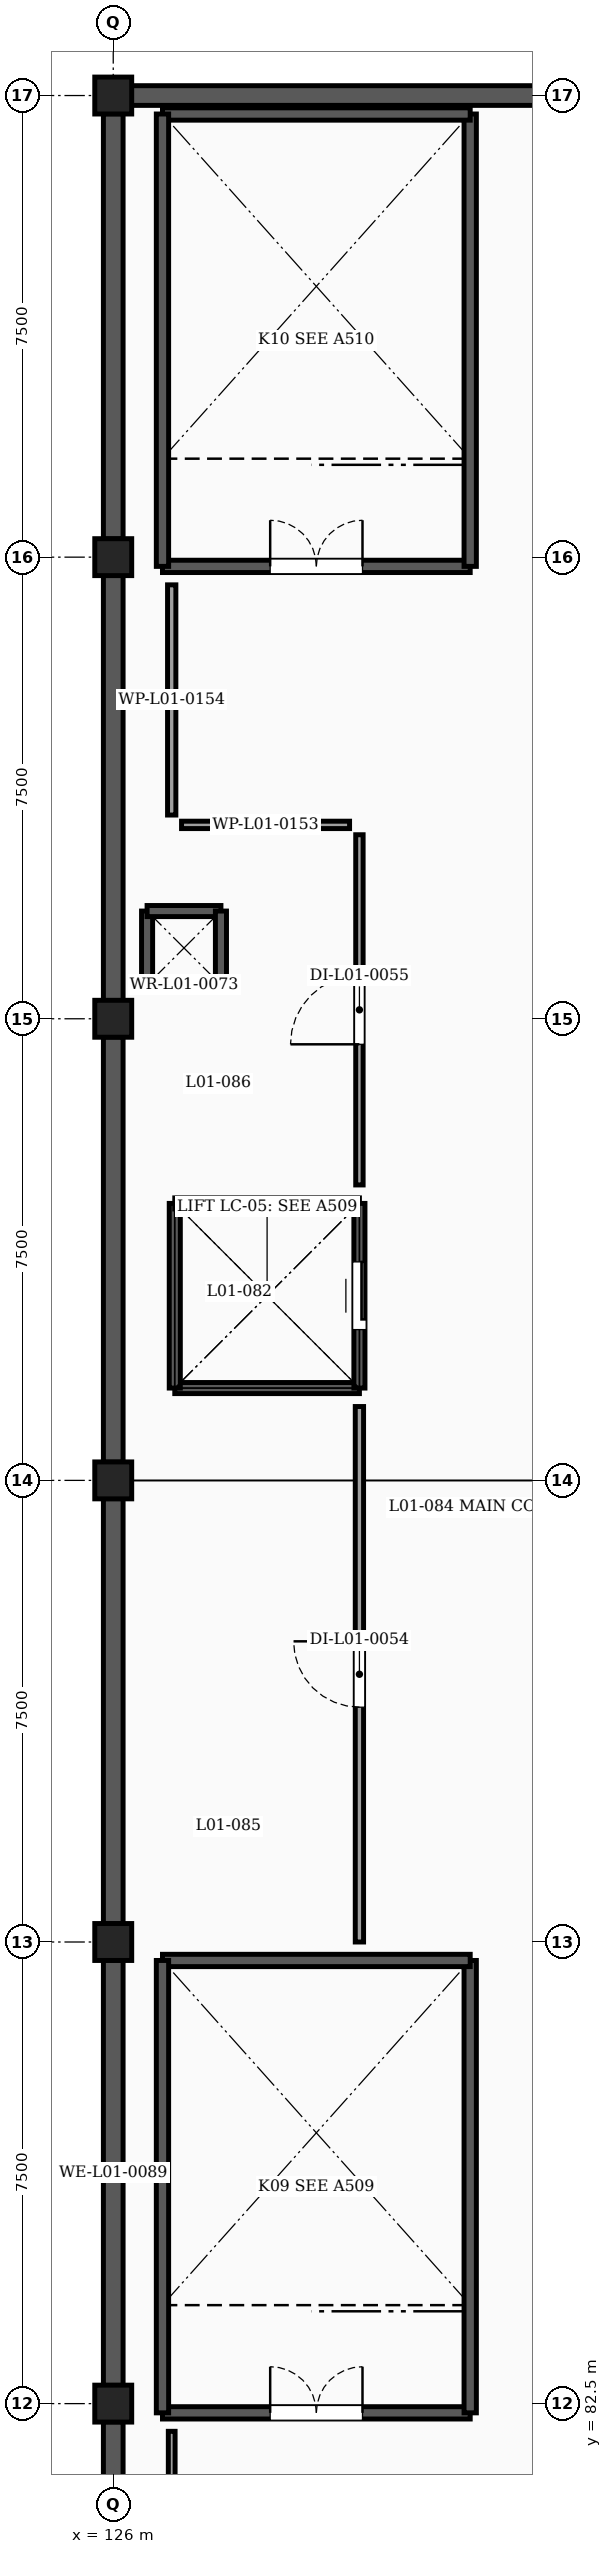
"""IFC4 building model, lengths in metres.
Left out: names, types, materials, properties, quantities, classifications, styles, units other than length and angle.
Written with IfcOpenShell. Run it as: python <this file> out.ifc"""

import sys

from ifc_helpers import new_model, si_unit, direction, frame, frame_2d, origin, origin_2d, place, context, subcontext, project, spatial, rectangle, extrude, element, fill, save


model = new_model("IFC4")
c1 = context("Model", 3, precision=1e-05, world=origin(), true_north=direction((0.0, 1.0)))
c2 = subcontext(c1, "Body", "Model", "MODEL_VIEW")
j1 = project(units=[si_unit("LENGTHUNIT", "METRE"), si_unit("PLANEANGLEUNIT", "RADIAN")], contexts=[c1])
p1 = place(None, origin())
s1 = spatial("IfcSite", under=j1, at=p1, CompositionType="ELEMENT")
p2 = place(p1, origin())
s2 = spatial("IfcBuilding", under=s1, at=p2, CompositionType="ELEMENT")
p3 = place(p2, frame((0.0, 0.0, 4.5)))
s3 = spatial("IfcBuildingStorey", under=s2, at=p3, CompositionType="ELEMENT", Elevation=4.5)
for number, where, z_axis, x_axis in (
    (1, (126.0, 82.5, 0.0), (0.0, 0.0, 1.0), (1.0, 0.0, 0.0)),
    (2, (126.0, 90.0, 0.0), (0.0, 0.0, 1.0), (1.0, 0.0, 0.0)),
    (3, (126.0, 97.5, 0.0), (0.0, 0.0, 1.0), (1.0, 0.0, 0.0)),
    (4, (126.0, 105.0, 0.0), (0.0, 0.0, 1.0), (1.0, 0.0, 0.0)),
    (5, (126.0, 112.5, 0.0), (0.0, 0.0, 1.0), (1.0, 0.0, 0.0)),
    (6, (126.0, 120.0, 0.0), (0.0, 0.0, 1.0), (1.0, 0.0, 0.0)),
):
    element("IfcColumn", number, at=place(p3, frame(where, z_axis=z_axis, x_axis=x_axis)), inside=s3, PredefinedType="COLUMN", context=c2, shape_type="SweptSolid", body=[
        extrude(rectangle(XDim=0.6, YDim=0.6, at=origin_2d()), origin(), (0.0, 0.0, 1.0), 3.62),
    ])
for number, where, z_axis, x_axis in (
    (7, (126.0, 75.296, 0.0), (0.0, 0.0, 1.0), (0.0, 1.0, 0.0)),
    (8, (126.0, 82.796, 0.0), (0.0, 0.0, 1.0), (0.0, 1.0, 0.0)),
    (9, (126.0, 90.296, 0.0), (0.0, 0.0, 1.0), (0.0, 1.0, 0.0)),
    (10, (126.0, 97.796, 0.0), (0.0, 0.0, 1.0), (0.0, 1.0, 0.0)),
    (11, (126.0, 105.296, 0.0), (0.0, 0.0, 1.0), (0.0, 1.0, 0.0)),
    (12, (126.0, 112.796, 0.0), (0.0, 0.0, 1.0), (0.0, 1.0, 0.0)),
):
    element("IfcWall", number, at=place(p3, frame(where, z_axis=z_axis, x_axis=x_axis)), inside=s3, PredefinedType="SOLIDWALL", context=c2, shape_type="SweptSolid", body=[
        extrude(rectangle(XDim=6.908, YDim=0.32, at=frame_2d((3.454, 0.0))), origin(), (0.0, 0.0, 1.0), 3.027),
    ])
p4 = place(p3, frame((126.296, 120.0, 0.0), z_axis=(0.0, 0.0, 1.0), x_axis=(1.0, 0.0, 0.0)))
e13 = element("IfcWall", 13, at=p4, inside=s3, PredefinedType="SOLIDWALL", context=c2, shape_type="SweptSolid", body=[
    extrude(rectangle(XDim=8.483, YDim=0.32, at=frame_2d((4.242, 0.0))), origin(), (0.0, 0.0, 1.0), 3.027),
])
for number, where, z_axis, x_axis in (
    (14, (127.75, 105.55, 0.0), (0.0, 0.0, 1.0), (-1.0, 0.0, 0.0)),
    (15, (126.55, 105.55, 0.0), (0.0, 0.0, 1.0), (0.0, 1.0, 0.0)),
    (16, (126.55, 106.75, 0.0), (0.0, 0.0, 1.0), (1.0, 0.0, 0.0)),
    (17, (127.75, 106.75, 0.0), (0.0, 0.0, 1.0), (0.0, -1.0, 0.0)),
):
    element("IfcWall", number, at=place(p3, frame(where, z_axis=z_axis, x_axis=x_axis)), inside=s3, PredefinedType="SHEAR", context=c2, shape_type="SweptSolid", body=[
        extrude(rectangle(XDim=1.2, YDim=0.18, at=frame_2d((0.6, 0.0))), origin(), (0.0, 0.0, 1.0), 3.62),
    ])
p5 = place(p3, frame((126.8, 82.35, 0.0), z_axis=(0.0, 0.0, 1.0), x_axis=(1.0, 0.0, 0.0)))
e18 = element("IfcWall", 18, at=p5, inside=s3, PredefinedType="SHEAR", context=c2, shape_type="SweptSolid", body=[
    extrude(rectangle(XDim=5.0, YDim=0.2, at=frame_2d((2.5, 0.0))), origin(), (0.0, 0.0, 1.0), 3.62),
])
p6 = place(p5, frame((1.75, 0.0, 0.0)))
e19 = element("IfcOpeningElement", 19, at=p6, cuts=e18, PredefinedType="OPENING", context=c2, shape_type="SweptSolid", body=[
    extrude(rectangle(XDim=1.5, YDim=2.15, at=frame_2d((0.75, 1.075))), frame((0.0, 0.11, 0.0), z_axis=(0.0, -1.0, 0.0), x_axis=(1.0, 0.0, 0.0)), (0.0, 0.0, 1.0), 0.22),
])
p7 = place(p3, frame((131.8, 82.35, 0.0), z_axis=(0.0, 0.0, 1.0), x_axis=(0.0, 1.0, 0.0)))
e20 = element("IfcWall", 20, at=p7, inside=s3, PredefinedType="SHEAR", context=c2, shape_type="SweptSolid", body=[
    extrude(rectangle(XDim=7.35, YDim=0.2, at=frame_2d((3.675, 0.0))), origin(), (0.0, 0.0, 1.0), 3.62),
])
p8 = place(p3, frame((131.8, 89.7, 0.0), z_axis=(0.0, 0.0, 1.0), x_axis=(-1.0, 0.0, 0.0)))
e21 = element("IfcWall", 21, at=p8, inside=s3, PredefinedType="SHEAR", context=c2, shape_type="SweptSolid", body=[
    extrude(rectangle(XDim=5.0, YDim=0.2, at=frame_2d((2.5, 0.0))), origin(), (0.0, 0.0, 1.0), 3.62),
])
p9 = place(p3, frame((126.8, 89.7, 0.0), z_axis=(0.0, 0.0, 1.0), x_axis=(0.0, -1.0, 0.0)))
e22 = element("IfcWall", 22, at=p9, inside=s3, PredefinedType="SHEAR", context=c2, shape_type="SweptSolid", body=[
    extrude(rectangle(XDim=7.35, YDim=0.2, at=frame_2d((3.675, 0.0))), origin(), (0.0, 0.0, 1.0), 3.62),
])
p10 = place(p3, frame((126.8, 112.35, 0.0), z_axis=(0.0, 0.0, 1.0), x_axis=(1.0, 0.0, 0.0)))
e23 = element("IfcWall", 23, at=p10, inside=s3, PredefinedType="SHEAR", context=c2, shape_type="SweptSolid", body=[
    extrude(rectangle(XDim=5.0, YDim=0.2, at=frame_2d((2.5, 0.0))), origin(), (0.0, 0.0, 1.0), 3.62),
])
p11 = place(p10, frame((1.75, 0.0, 0.0)))
e24 = element("IfcOpeningElement", 24, at=p11, cuts=e23, PredefinedType="OPENING", context=c2, shape_type="SweptSolid", body=[
    extrude(rectangle(XDim=1.5, YDim=2.15, at=frame_2d((0.75, 1.075))), frame((0.0, 0.11, 0.0), z_axis=(0.0, -1.0, 0.0), x_axis=(1.0, 0.0, 0.0)), (0.0, 0.0, 1.0), 0.22),
])
p12 = place(p3, frame((131.8, 112.35, 0.0), z_axis=(0.0, 0.0, 1.0), x_axis=(0.0, 1.0, 0.0)))
e25 = element("IfcWall", 25, at=p12, inside=s3, PredefinedType="SHEAR", context=c2, shape_type="SweptSolid", body=[
    extrude(rectangle(XDim=7.35, YDim=0.2, at=frame_2d((3.675, 0.0))), origin(), (0.0, 0.0, 1.0), 3.62),
])
p13 = place(p3, frame((131.8, 119.7, 0.0), z_axis=(0.0, 0.0, 1.0), x_axis=(-1.0, 0.0, 0.0)))
e26 = element("IfcWall", 26, at=p13, inside=s3, PredefinedType="SHEAR", context=c2, shape_type="SweptSolid", body=[
    extrude(rectangle(XDim=5.0, YDim=0.2, at=frame_2d((2.5, 0.0))), origin(), (0.0, 0.0, 1.0), 3.62),
])
p14 = place(p3, frame((126.8, 119.7, 0.0), z_axis=(0.0, 0.0, 1.0), x_axis=(0.0, -1.0, 0.0)))
e27 = element("IfcWall", 27, at=p14, inside=s3, PredefinedType="SHEAR", context=c2, shape_type="SweptSolid", body=[
    extrude(rectangle(XDim=7.35, YDim=0.2, at=frame_2d((3.675, 0.0))), origin(), (0.0, 0.0, 1.0), 3.62),
])
for number, where, z_axis, x_axis in (
    (28, (130.0, 99.0, 0.0), (0.0, 0.0, 1.0), (-1.0, 0.0, 0.0)),
    (29, (127.0, 99.0, 0.0), (0.0, 0.0, 1.0), (0.0, 1.0, 0.0)),
    (30, (127.0, 102.0, 0.0), (0.0, 0.0, 1.0), (1.0, 0.0, 0.0)),
):
    element("IfcWall", number, at=place(p3, frame(where, z_axis=z_axis, x_axis=x_axis)), inside=s3, PredefinedType="SHEAR", context=c2, shape_type="SweptSolid", body=[
        extrude(rectangle(XDim=3.0, YDim=0.18, at=frame_2d((1.5, 0.0))), origin(), (0.0, 0.0, 1.0), 3.62),
    ])
p15 = place(p3, frame((130.0, 102.0, 0.0), z_axis=(0.0, 0.0, 1.0), x_axis=(0.0, -1.0, 0.0)))
e31 = element("IfcWall", 31, at=p15, inside=s3, PredefinedType="SHEAR", context=c2, shape_type="SweptSolid", body=[
    extrude(rectangle(XDim=3.0, YDim=0.18, at=frame_2d((1.5, 0.0))), origin(), (0.0, 0.0, 1.0), 3.62),
])
p16 = place(p15, frame((0.95, 0.0, 0.0)))
e32 = element("IfcOpeningElement", 32, at=p16, cuts=e31, PredefinedType="OPENING", context=c2, shape_type="SweptSolid", body=[
    extrude(rectangle(XDim=1.1, YDim=2.15, at=frame_2d((0.55, 1.075))), frame((0.0, 0.1, 0.0), z_axis=(0.0, -1.0, 0.0), x_axis=(1.0, 0.0, 0.0)), (0.0, 0.0, 1.0), 0.2),
])
p17 = place(p3, frame((126.95, 78.31, 0.0), z_axis=(0.0, 0.0, 1.0), x_axis=(0.0, 1.0, 0.0)))
e33 = element("IfcWall", 33, at=p17, inside=s3, PredefinedType="PARTITIONING", context=c2, shape_type="SweptSolid", body=[
    extrude(rectangle(XDim=3.74, YDim=0.11, at=frame_2d((1.87, 0.0))), origin(), (0.0, 0.0, 1.0), 3.62),
])
p18 = place(p3, frame((130.0, 90.0, 0.0), z_axis=(0.0, 0.0, 1.0), x_axis=(0.0, 1.0, 0.0)))
e34 = element("IfcWall", 34, at=p18, inside=s3, PredefinedType="PARTITIONING", context=c2, shape_type="SweptSolid", body=[
    extrude(rectangle(XDim=8.7, YDim=0.135, at=frame_2d((4.35, 0.0))), origin(), (0.0, 0.0, 1.0), 3.62),
])
p19 = place(p18, frame((3.815, 0.0, 0.0)))
e35 = element("IfcOpeningElement", 35, at=p19, cuts=e34, PredefinedType="OPENING", context=c2, shape_type="SweptSolid", body=[
    extrude(rectangle(XDim=1.07, YDim=2.15, at=frame_2d((0.535, 1.075))), frame((0.0, 0.077, 0.0), z_axis=(0.0, -1.0, 0.0), x_axis=(1.0, 0.0, 0.0)), (0.0, 0.0, 1.0), 0.155),
])
p20 = place(p3, frame((129.84, 108.15, 0.0), z_axis=(0.0, 0.0, 1.0), x_axis=(-1.0, 0.0, 0.0)))
e36 = element("IfcWall", 36, at=p20, inside=s3, PredefinedType="PARTITIONING", context=c2, shape_type="SweptSolid", body=[
    extrude(rectangle(XDim=2.73, YDim=0.12, at=frame_2d((1.365, 0.0))), origin(), (0.0, 0.0, 1.0), 3.62),
])
p21 = place(p3, frame((126.95, 108.31, 0.0), z_axis=(0.0, 0.0, 1.0), x_axis=(0.0, 1.0, 0.0)))
e37 = element("IfcWall", 37, at=p21, inside=s3, PredefinedType="PARTITIONING", context=c2, shape_type="SweptSolid", body=[
    extrude(rectangle(XDim=3.74, YDim=0.135, at=frame_2d((1.87, 0.0))), origin(), (0.0, 0.0, 1.0), 3.62),
])
p22 = place(p3, frame((130.0, 102.3, 0.0), z_axis=(0.0, 0.0, 1.0), x_axis=(0.0, 1.0, 0.0)))
e38 = element("IfcWall", 38, at=p22, inside=s3, PredefinedType="PARTITIONING", context=c2, shape_type="SweptSolid", body=[
    extrude(rectangle(XDim=5.69, YDim=0.12, at=frame_2d((2.845, 0.0))), origin(), (0.0, 0.0, 1.0), 3.62),
])
p23 = place(p22, frame((2.285, 0.0, 0.0)))
e39 = element("IfcOpeningElement", 39, at=p23, cuts=e38, PredefinedType="OPENING", context=c2, shape_type="SweptSolid", body=[
    extrude(rectangle(XDim=1.12, YDim=2.15, at=frame_2d((0.56, 1.075))), frame((0.0, 0.07, 0.0), z_axis=(0.0, -1.0, 0.0), x_axis=(1.0, 0.0, 0.0)), (0.0, 0.0, 1.0), 0.14),
])
p24 = place(p6, origin())
e40 = element("IfcDoor", 40, at=p24, inside=s3, OperationType="DOUBLE_DOOR_SINGLE_SWING", PredefinedType="DOOR", context=c2, shape_type="SweptSolid", body=[
    extrude(rectangle(XDim=1.5, YDim=2.15, at=frame_2d((0.75, 1.075))), frame((0.0, 0.025, 0.0), z_axis=(0.0, -1.0, 0.0), x_axis=(1.0, 0.0, 0.0)), (0.0, 0.0, 1.0), 0.05),
])
fill(e19, e40)
p25 = place(p11, origin())
e41 = element("IfcDoor", 41, at=p25, inside=s3, OperationType="DOUBLE_DOOR_SINGLE_SWING", PredefinedType="DOOR", context=c2, shape_type="SweptSolid", body=[
    extrude(rectangle(XDim=1.5, YDim=2.15, at=frame_2d((0.75, 1.075))), frame((0.0, 0.025, 0.0), z_axis=(0.0, -1.0, 0.0), x_axis=(1.0, 0.0, 0.0)), (0.0, 0.0, 1.0), 0.05),
])
fill(e24, e41)
p26 = place(p16, origin())
e42 = element("IfcDoor", 42, at=p26, inside=s3, OperationType="SLIDING_TO_LEFT", PredefinedType="DOOR", context=c2, shape_type="SweptSolid", body=[
    extrude(rectangle(XDim=1.1, YDim=2.15, at=frame_2d((0.55, 1.075))), frame((0.0, 0.025, 0.0), z_axis=(0.0, -1.0, 0.0), x_axis=(1.0, 0.0, 0.0)), (0.0, 0.0, 1.0), 0.05),
])
fill(e32, e42)
p27 = place(p19, origin())
e43 = element("IfcDoor", 43, at=p27, inside=s3, OperationType="SINGLE_SWING_RIGHT", PredefinedType="DOOR", context=c2, shape_type="SweptSolid", body=[
    extrude(rectangle(XDim=1.07, YDim=2.15, at=frame_2d((0.535, 1.075))), frame((0.0, 0.025, 0.0), z_axis=(0.0, -1.0, 0.0), x_axis=(1.0, 0.0, 0.0)), (0.0, 0.0, 1.0), 0.05),
])
fill(e35, e43)
p28 = place(p23, origin())
e44 = element("IfcDoor", 44, at=p28, inside=s3, OperationType="SINGLE_SWING_LEFT", PredefinedType="DOOR", context=c2, shape_type="SweptSolid", body=[
    extrude(rectangle(XDim=1.12, YDim=2.15, at=frame_2d((0.56, 1.075))), frame((0.0, 0.025, 0.0), z_axis=(0.0, -1.0, 0.0), x_axis=(1.0, 0.0, 0.0)), (0.0, 0.0, 1.0), 0.05),
])
fill(e39, e44)
save(model, sys.argv[1])
